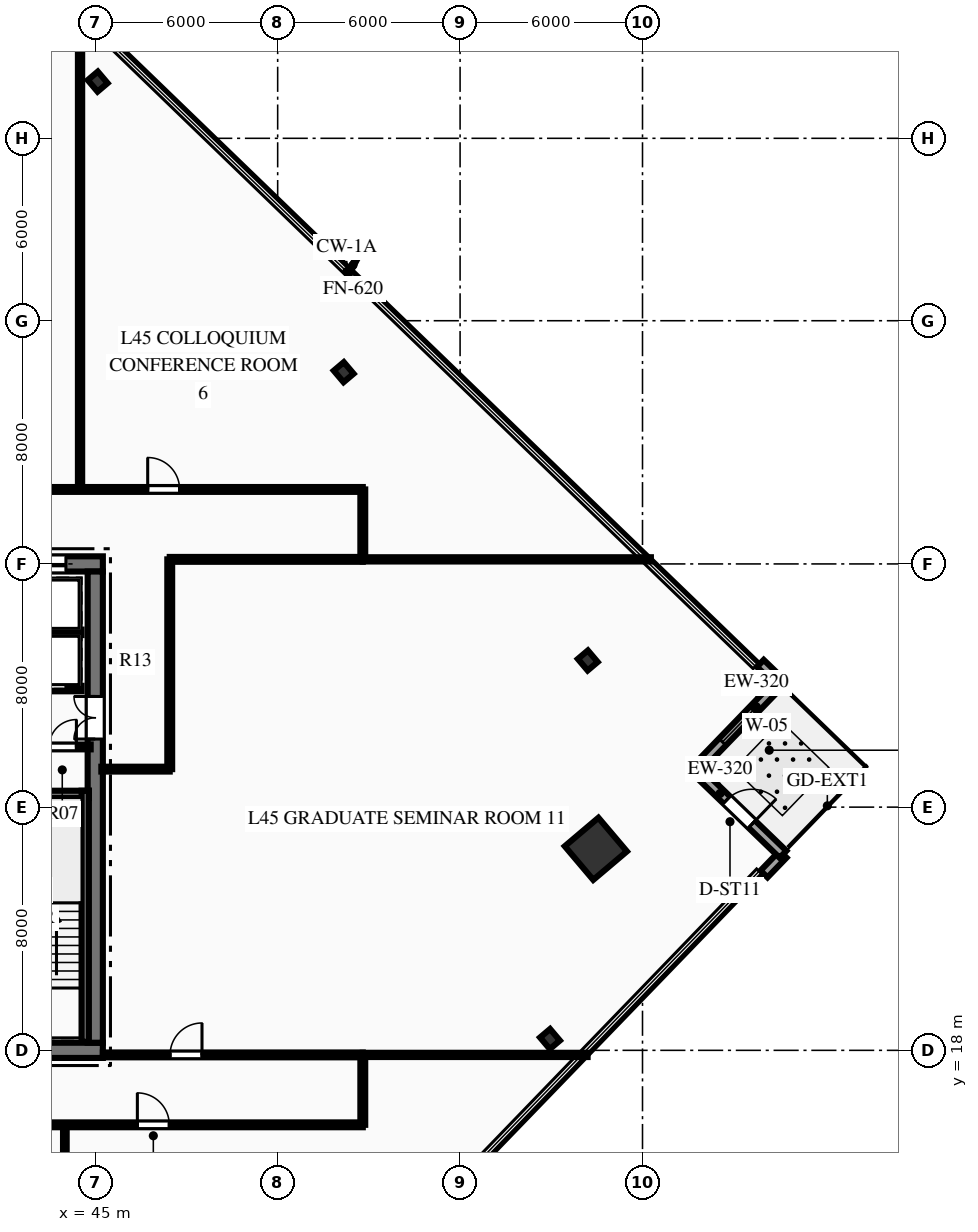
"""IFC4 building model, lengths in metres.
Left out: names, types, materials, properties, quantities, classifications, styles, units other than length and angle.
Written with IfcOpenShell. Run it as: python <this file> out.ifc"""

import sys

from ifc_helpers import new_model, si_unit, direction, frame, frame_2d, origin, origin_2d, place, context, subcontext, project, spatial, rectangle, hollow_rectangle, i_section, extrude, element, fill, save


model = new_model("IFC4")
c1 = context("Model", 3, precision=1e-05, world=origin(), true_north=direction((0.0, 1.0)))
c2 = subcontext(c1, "Body", "Model", "MODEL_VIEW")
j1 = project(units=[si_unit("LENGTHUNIT", "METRE"), si_unit("PLANEANGLEUNIT", "RADIAN")], contexts=[c1])
p1 = place(None, origin())
s1 = spatial("IfcSite", under=j1, at=p1, CompositionType="ELEMENT")
p2 = place(p1, origin())
s2 = spatial("IfcBuilding", under=s1, at=p2, CompositionType="ELEMENT")
p3 = place(p2, frame((0.0, 0.0, 181.95)))
s3 = spatial("IfcBuildingStorey", under=s2, at=p3, CompositionType="ELEMENT", Elevation=181.95)
p4 = place(p3, frame((26.75, 18.0, 0.0), z_axis=(0.0, 0.0, 1.0), x_axis=(1.0, 0.0, 0.0)))
e1 = element("IfcWall", 1, at=p4, inside=s3, PredefinedType="SHEAR", context=c2, shape_type="SweptSolid", body=[
    extrude(rectangle(XDim=18.5, YDim=0.5, at=frame_2d((9.25, 0.0))), origin(), (0.0, 0.0, 1.0), 3.75),
])
p5 = place(p4, frame((7.35, 0.0, 0.0)))
e2 = element("IfcOpeningElement", 2, at=p5, cuts=e1, PredefinedType="OPENING", context=c2, shape_type="SweptSolid", body=[
    extrude(rectangle(XDim=1.1, YDim=2.15, at=frame_2d((0.55, 1.075))), frame((0.0, 0.26, 0.0), z_axis=(0.0, -1.0, 0.0), x_axis=(1.0, 0.0, 0.0)), (0.0, 0.0, 1.0), 0.52),
])
p6 = place(p4, frame((10.05, 0.0, 0.0)))
e3 = element("IfcOpeningElement", 3, at=p6, cuts=e1, PredefinedType="OPENING", context=c2, shape_type="SweptSolid", body=[
    extrude(rectangle(XDim=1.1, YDim=2.15, at=frame_2d((0.55, 1.075))), frame((0.0, 0.26, 0.0), z_axis=(0.0, -1.0, 0.0), x_axis=(1.0, 0.0, 0.0)), (0.0, 0.0, 1.0), 0.52),
])
p7 = place(p3, frame((26.75, 34.0, 0.0), z_axis=(0.0, 0.0, 1.0), x_axis=(1.0, 0.0, 0.0)))
e4 = element("IfcWall", 4, at=p7, inside=s3, PredefinedType="SHEAR", context=c2, shape_type="SweptSolid", body=[
    extrude(rectangle(XDim=18.5, YDim=0.5, at=frame_2d((9.25, 0.0))), origin(), (0.0, 0.0, 1.0), 3.75),
])
p8 = place(p7, frame((13.935, 0.0, 0.0)))
e5 = element("IfcOpeningElement", 5, at=p8, cuts=e4, PredefinedType="OPENING", context=c2, shape_type="SweptSolid", body=[
    extrude(rectangle(XDim=1.1, YDim=2.15, at=frame_2d((0.55, 1.075))), frame((0.0, 0.26, 0.0), z_axis=(0.0, -1.0, 0.0), x_axis=(1.0, 0.0, 0.0)), (0.0, 0.0, 1.0), 0.52),
])
p9 = place(p7, frame((16.185, 0.0, 0.0)))
e6 = element("IfcOpeningElement", 6, at=p9, cuts=e4, PredefinedType="OPENING", context=c2, shape_type="SweptSolid", body=[
    extrude(rectangle(XDim=1.1, YDim=2.15, at=frame_2d((0.55, 1.075))), frame((0.0, 0.26, 0.0), z_axis=(0.0, -1.0, 0.0), x_axis=(1.0, 0.0, 0.0)), (0.0, 0.0, 1.0), 0.52),
])
p10 = place(p3, frame((45.0, 18.25, 0.0), z_axis=(0.0, 0.0, 1.0), x_axis=(0.0, 1.0, 0.0)))
e7 = element("IfcWall", 7, at=p10, inside=s3, PredefinedType="SHEAR", context=c2, shape_type="SweptSolid", body=[
    extrude(rectangle(XDim=15.5, YDim=0.5, at=frame_2d((7.75, 0.0))), origin(), (0.0, 0.0, 1.0), 3.75),
])
p11 = place(p10, frame((9.99, 0.0, 0.0)))
e8 = element("IfcOpeningElement", 8, at=p11, cuts=e7, PredefinedType="OPENING", context=c2, shape_type="SweptSolid", body=[
    extrude(rectangle(XDim=1.4, YDim=2.2, at=frame_2d((0.7, 1.1))), frame((0.0, 0.26, 0.0), z_axis=(0.0, -1.0, 0.0), x_axis=(1.0, 0.0, 0.0)), (0.0, 0.0, 1.0), 0.52),
])
p12 = place(p3, frame((40.81, 26.42, 0.0), z_axis=(0.0, 0.0, 1.0), x_axis=(1.0, 0.0, 0.0)))
e9 = element("IfcWall", 9, at=p12, inside=s3, PredefinedType="SHEAR", context=c2, shape_type="SweptSolid", body=[
    extrude(rectangle(XDim=3.98, YDim=0.24, at=frame_2d((1.99, 0.0))), origin(), (0.0, 0.0, 1.0), 3.75),
])
p13 = place(p3, frame((44.67, 18.28, 0.0), z_axis=(0.0, 0.0, 1.0), x_axis=(0.0, 1.0, 0.0)))
e10 = element("IfcWall", 10, at=p13, inside=s3, PredefinedType="SHEAR", context=c2, shape_type="SweptSolid", body=[
    extrude(rectangle(XDim=8.26, YDim=0.24, at=frame_2d((4.13, 0.0))), origin(), (0.0, 0.0, 1.0), 3.75),
])
p14 = place(p3, frame((61.465, 24.629, 0.0), z_axis=(0.0, 0.0, 1.0), x_axis=(0.763232469783, 0.646123979643, 0.0)))
e11 = element("IfcColumn", 11, at=p14, inside=s3, PredefinedType="COLUMN", context=c2, shape_type="SweptSolid", body=[
    extrude(hollow_rectangle(XDim=1.45, YDim=1.45, WallThickness=0.07, at=origin_2d()), origin(), (0.0, 0.0, 1.0), 3.75),
])
for number, where, z_axis, x_axis in (
    (12, (59.956, 18.373, 0.0), (0.0, 0.0, 1.0), (0.763, 0.646, 0.0)),
    (13, (61.199, 30.824, 0.0), (0.0, 0.0, 1.0), (0.763, 0.646, 0.0)),
    (14, (53.171, 40.307, 0.0), (0.0, 0.0, 1.0), (0.763, 0.646, 0.0)),
    (15, (45.08, 49.865, 0.0), (0.0, 0.0, 1.0), (0.763, 0.646, 0.0)),
):
    element("IfcColumn", number, at=place(p3, frame(where, z_axis=z_axis, x_axis=x_axis)), inside=s3, PredefinedType="COLUMN", context=c2, shape_type="SweptSolid", body=[
        extrude(i_section(OverallWidth=0.432, OverallDepth=0.498, WebThickness=0.056, FlangeThickness=0.089, at=origin_2d()), origin(), (0.0, 0.0, 1.0), 3.75),
    ])
p15 = place(p3, frame((67.622, 24.448, 0.0), z_axis=(0.0, 0.0, 1.0), x_axis=(-0.694657439791, -0.719340699073, 0.0)))
e16 = element("IfcWall", 16, at=p15, inside=s3, PredefinedType="STANDARD", context=c2, shape_type="SweptSolid", body=[
    extrude(rectangle(XDim=0.9, YDim=0.32, at=frame_2d((0.45, 0.0))), origin(), (0.0, 0.0, 1.0), 3.46),
])
p16 = place(p3, frame((64.744, 27.227, 0.0), z_axis=(0.0, 0.0, 1.0), x_axis=(0.719358340361, -0.694639171191, 0.0)))
e17 = element("IfcWall", 17, at=p16, inside=s3, PredefinedType="STANDARD", context=c2, shape_type="SweptSolid", body=[
    extrude(rectangle(XDim=4.0, YDim=0.32, at=frame_2d((2.0, 0.0))), origin(), (0.0, 0.0, 1.0), 3.46),
])
p17 = place(p16, frame((1.425, 0.0, 0.0)))
e18 = element("IfcOpeningElement", 18, at=p17, cuts=e17, PredefinedType="OPENING", context=c2, shape_type="SweptSolid", body=[
    extrude(rectangle(XDim=1.15, YDim=2.2, at=frame_2d((0.575, 1.1))), frame((0.0, 0.17, 0.0), z_axis=(0.0, -1.0, 0.0), x_axis=(1.0, 0.0, 0.0)), (0.0, 0.0, 1.0), 0.34),
])
p18 = place(p3, frame((67.523, 30.104, 0.0), z_axis=(0.0, 0.0, 1.0), x_axis=(-0.694670753348, -0.719327842116, 0.0)))
e19 = element("IfcWall", 19, at=p18, inside=s3, PredefinedType="STANDARD", context=c2, shape_type="SweptSolid", body=[
    extrude(rectangle(XDim=4.0, YDim=0.32, at=frame_2d((2.0, 0.0))), origin(), (0.0, 0.0, 1.0), 3.46),
])
p19 = place(p18, frame((1.275, 0.0, 0.85)))
e20 = element("IfcOpeningElement", 20, at=p19, cuts=e19, PredefinedType="OPENING", context=c2, shape_type="SweptSolid", body=[
    extrude(rectangle(XDim=1.45, YDim=2.05, at=frame_2d((0.725, 1.025))), frame((0.0, 0.17, 0.0), z_axis=(0.0, -1.0, 0.0), x_axis=(1.0, 0.0, 0.0)), (0.0, 0.0, 1.0), 0.34),
])
p20 = place(p3, frame((66.876, 30.729, 0.0), z_axis=(0.0, 0.0, 1.0), x_axis=(0.719340699073, -0.694657439791, 0.0)))
e21 = element("IfcWall", 21, at=p20, inside=s3, PredefinedType="STANDARD", context=c2, shape_type="SweptSolid", body=[
    extrude(rectangle(XDim=0.9, YDim=0.32, at=frame_2d((0.45, 0.0))), origin(), (0.0, 0.0, 1.0), 3.46),
])
p21 = place(p3, frame((40.8, 27.98, 0.0), z_axis=(0.0, 0.0, 1.0), x_axis=(1.0, 0.0, 0.0)))
e22 = element("IfcWall", 22, at=p21, inside=s3, PredefinedType="PARTITIONING", context=c2, shape_type="SweptSolid", body=[
    extrude(rectangle(XDim=4.05, YDim=0.16, at=frame_2d((2.025, 0.0))), origin(), (0.0, 0.0, 1.0), 3.46),
])
p22 = place(p21, frame((0.77, 0.0, 0.0)))
e23 = element("IfcOpeningElement", 23, at=p22, cuts=e22, PredefinedType="OPENING", context=c2, shape_type="SweptSolid", body=[
    extrude(rectangle(XDim=0.9, YDim=2.15, at=frame_2d((0.45, 1.075))), frame((0.0, 0.09, 0.0), z_axis=(0.0, -1.0, 0.0), x_axis=(1.0, 0.0, 0.0)), (0.0, 0.0, 1.0), 0.18),
])
p23 = place(p21, frame((2.68, 0.0, 0.0)))
e24 = element("IfcOpeningElement", 24, at=p23, cuts=e22, PredefinedType="OPENING", context=c2, shape_type="SweptSolid", body=[
    extrude(rectangle(XDim=0.9, YDim=2.15, at=frame_2d((0.45, 1.075))), frame((0.0, 0.09, 0.0), z_axis=(0.0, -1.0, 0.0), x_axis=(1.0, 0.0, 0.0)), (0.0, 0.0, 1.0), 0.18),
])
p24 = place(p3, frame((40.12, 29.9, 0.0), z_axis=(0.0, 0.0, 1.0), x_axis=(1.0, 0.0, 0.0)))
e25 = element("IfcWall", 25, at=p24, inside=s3, PredefinedType="PARTITIONING", context=c2, shape_type="SweptSolid", body=[
    extrude(rectangle(XDim=4.43, YDim=0.18, at=frame_2d((2.215, 0.0))), origin(), (0.0, 0.0, 1.0), 3.46),
])
p25 = place(p24, frame((0.565, 0.0, 0.0)))
e26 = element("IfcOpeningElement", 26, at=p25, cuts=e25, PredefinedType="OPENING", context=c2, shape_type="SweptSolid", body=[
    extrude(rectangle(XDim=1.1, YDim=2.15, at=frame_2d((0.55, 1.075))), frame((0.0, 0.1, 0.0), z_axis=(0.0, -1.0, 0.0), x_axis=(1.0, 0.0, 0.0)), (0.0, 0.0, 1.0), 0.2),
])
p26 = place(p24, frame((2.815, 0.0, 0.0)))
e27 = element("IfcOpeningElement", 27, at=p26, cuts=e25, PredefinedType="OPENING", context=c2, shape_type="SweptSolid", body=[
    extrude(rectangle(XDim=1.1, YDim=2.15, at=frame_2d((0.55, 1.075))), frame((0.0, 0.1, 0.0), z_axis=(0.0, -1.0, 0.0), x_axis=(1.0, 0.0, 0.0)), (0.0, 0.0, 1.0), 0.2),
])
p27 = place(p3, frame((40.12, 31.75, 0.0), z_axis=(0.0, 0.0, 1.0), x_axis=(1.0, 0.0, 0.0)))
e28 = element("IfcWall", 28, at=p27, inside=s3, PredefinedType="PARTITIONING", context=c2, shape_type="SweptSolid", body=[
    extrude(rectangle(XDim=4.43, YDim=0.18, at=frame_2d((2.215, 0.0))), origin(), (0.0, 0.0, 1.0), 3.46),
])
p28 = place(p3, frame((18.2, 15.55, 0.0), z_axis=(0.0, 0.0, 1.0), x_axis=(1.0, 0.0, 0.0)))
e29 = element("IfcWall", 29, at=p28, inside=s3, PredefinedType="PARTITIONING", context=c2, shape_type="SweptSolid", body=[
    extrude(rectangle(XDim=35.6, YDim=0.16, at=frame_2d((17.8, 0.0))), origin(), (0.0, 0.0, 1.0), 3.46),
])
p29 = place(p28, frame((7.55, 0.0, 0.0)))
e30 = element("IfcOpeningElement", 30, at=p29, cuts=e29, PredefinedType="OPENING", context=c2, shape_type="SweptSolid", body=[
    extrude(rectangle(XDim=0.9, YDim=2.15, at=frame_2d((0.45, 1.075))), frame((0.0, 0.09, 0.0), z_axis=(0.0, -1.0, 0.0), x_axis=(1.0, 0.0, 0.0)), (0.0, 0.0, 1.0), 0.18),
])
p30 = place(p28, frame((9.85, 0.0, 0.0)))
e31 = element("IfcOpeningElement", 31, at=p30, cuts=e29, PredefinedType="OPENING", context=c2, shape_type="SweptSolid", body=[
    extrude(rectangle(XDim=0.9, YDim=2.15, at=frame_2d((0.45, 1.075))), frame((0.0, 0.09, 0.0), z_axis=(0.0, -1.0, 0.0), x_axis=(1.0, 0.0, 0.0)), (0.0, 0.0, 1.0), 0.18),
])
p31 = place(p28, frame((12.1, 0.0, 0.0)))
e32 = element("IfcOpeningElement", 32, at=p31, cuts=e29, PredefinedType="OPENING", context=c2, shape_type="SweptSolid", body=[
    extrude(rectangle(XDim=1.0, YDim=2.15, at=frame_2d((0.5, 1.075))), frame((0.0, 0.09, 0.0), z_axis=(0.0, -1.0, 0.0), x_axis=(1.0, 0.0, 0.0)), (0.0, 0.0, 1.0), 0.18),
])
p32 = place(p28, frame((16.975, 0.0, 0.0)))
e33 = element("IfcOpeningElement", 33, at=p32, cuts=e29, PredefinedType="OPENING", context=c2, shape_type="SweptSolid", body=[
    extrude(rectangle(XDim=1.05, YDim=2.15, at=frame_2d((0.525, 1.075))), frame((0.0, 0.09, 0.0), z_axis=(0.0, -1.0, 0.0), x_axis=(1.0, 0.0, 0.0)), (0.0, 0.0, 1.0), 0.18),
])
p33 = place(p28, frame((28.185, 0.0, 0.0)))
e34 = element("IfcOpeningElement", 34, at=p33, cuts=e29, PredefinedType="OPENING", context=c2, shape_type="SweptSolid", body=[
    extrude(rectangle(XDim=1.05, YDim=2.15, at=frame_2d((0.525, 1.075))), frame((0.0, 0.09, 0.0), z_axis=(0.0, -1.0, 0.0), x_axis=(1.0, 0.0, 0.0)), (0.0, 0.0, 1.0), 0.18),
])
p34 = place(p3, frame((45.25, 17.85, 0.0), z_axis=(0.0, 0.0, 1.0), x_axis=(1.0, 0.0, 0.0)))
e35 = element("IfcWall", 35, at=p34, inside=s3, PredefinedType="PARTITIONING", context=c2, shape_type="SweptSolid", body=[
    extrude(rectangle(XDim=8.55, YDim=0.16, at=frame_2d((4.275, 0.0))), origin(), (0.0, 0.0, 1.0), 2.839),
])
p35 = place(p34, frame((2.211, 0.0, 0.0)))
e36 = element("IfcOpeningElement", 36, at=p35, cuts=e35, PredefinedType="OPENING", context=c2, shape_type="SweptSolid", body=[
    extrude(rectangle(XDim=1.05, YDim=2.15, at=frame_2d((0.525, 1.075))), frame((0.0, 0.09, 0.0), z_axis=(0.0, -1.0, 0.0), x_axis=(1.0, 0.0, 0.0)), (0.0, 0.0, 1.0), 0.18),
])
p36 = place(p3, frame((18.2, 36.45, 0.0), z_axis=(0.0, 0.0, 1.0), x_axis=(1.0, 0.0, 0.0)))
e37 = element("IfcWall", 37, at=p36, inside=s3, PredefinedType="PARTITIONING", context=c2, shape_type="SweptSolid", body=[
    extrude(rectangle(XDim=35.6, YDim=0.16, at=frame_2d((17.8, 0.0))), origin(), (0.0, 0.0, 1.0), 3.46),
])
p37 = place(p36, frame((1.917, 0.0, 0.0)))
e38 = element("IfcOpeningElement", 38, at=p37, cuts=e37, PredefinedType="OPENING", context=c2, shape_type="SweptSolid", body=[
    extrude(rectangle(XDim=1.05, YDim=2.15, at=frame_2d((0.525, 1.075))), frame((0.0, 0.09, 0.0), z_axis=(0.0, -1.0, 0.0), x_axis=(1.0, 0.0, 0.0)), (0.0, 0.0, 1.0), 0.18),
])
p38 = place(p36, frame((13.695, 0.0, 0.0)))
e39 = element("IfcOpeningElement", 39, at=p38, cuts=e37, PredefinedType="OPENING", context=c2, shape_type="SweptSolid", body=[
    extrude(rectangle(XDim=1.05, YDim=2.15, at=frame_2d((0.525, 1.075))), frame((0.0, 0.09, 0.0), z_axis=(0.0, -1.0, 0.0), x_axis=(1.0, 0.0, 0.0)), (0.0, 0.0, 1.0), 0.18),
])
p39 = place(p36, frame((19.535, 0.0, 0.0)))
e40 = element("IfcOpeningElement", 40, at=p39, cuts=e37, PredefinedType="OPENING", context=c2, shape_type="SweptSolid", body=[
    extrude(rectangle(XDim=1.05, YDim=2.15, at=frame_2d((0.525, 1.075))), frame((0.0, 0.09, 0.0), z_axis=(0.0, -1.0, 0.0), x_axis=(1.0, 0.0, 0.0)), (0.0, 0.0, 1.0), 0.18),
])
p40 = place(p36, frame((28.525, 0.0, 0.0)))
e41 = element("IfcOpeningElement", 41, at=p40, cuts=e37, PredefinedType="OPENING", context=c2, shape_type="SweptSolid", body=[
    extrude(rectangle(XDim=1.05, YDim=2.15, at=frame_2d((0.525, 1.075))), frame((0.0, 0.09, 0.0), z_axis=(0.0, -1.0, 0.0), x_axis=(1.0, 0.0, 0.0)), (0.0, 0.0, 1.0), 0.18),
])
p41 = place(p3, frame((47.45, 34.15, 0.0), z_axis=(0.0, 0.0, 1.0), x_axis=(1.0, 0.0, 0.0)))
e42 = element("IfcWall", 42, at=p41, inside=s3, PredefinedType="PARTITIONING", context=c2, shape_type="SweptSolid", body=[
    extrude(rectangle(XDim=6.35, YDim=0.16, at=frame_2d((3.175, 0.0))), origin(), (0.0, 0.0, 1.0), 3.46),
])
p42 = place(p3, frame((47.45, 27.25, 0.0), z_axis=(0.0, 0.0, 1.0), x_axis=(0.0, 1.0, 0.0)))
e43 = element("IfcWall", 43, at=p42, inside=s3, PredefinedType="PARTITIONING", context=c2, shape_type="SweptSolid", body=[
    extrude(rectangle(XDim=6.9, YDim=0.16, at=frame_2d((3.45, 0.0))), origin(), (0.0, 0.0, 1.0), 3.46),
])
p43 = place(p3, frame((45.2, 27.25, 0.0), z_axis=(0.0, 0.0, 1.0), x_axis=(1.0, 0.0, 0.0)))
e44 = element("IfcWall", 44, at=p43, inside=s3, PredefinedType="PARTITIONING", context=c2, shape_type="SweptSolid", body=[
    extrude(rectangle(XDim=2.25, YDim=0.16, at=frame_2d((1.125, 0.0))), origin(), (0.0, 0.0, 1.0), 3.46),
])
for number, where, z_axis, x_axis in (
    (45, (53.8, 15.55, 0.0), (0.0, 0.0, 1.0), (0.0, 1.0, 0.0)),
    (46, (53.8, 34.15, 0.0), (0.0, 0.0, 1.0), (0.0, 1.0, 0.0)),
):
    element("IfcWall", number, at=place(p3, frame(where, z_axis=z_axis, x_axis=x_axis)), inside=s3, PredefinedType="PARTITIONING", context=c2, shape_type="SweptSolid", body=[
        extrude(rectangle(XDim=2.3, YDim=0.16, at=frame_2d((1.15, 0.0))), origin(), (0.0, 0.0, 1.0), 3.46),
    ])
p44 = place(p3, frame((53.8, 17.85, 0.0), z_axis=(0.0, 0.0, 1.0), x_axis=(1.0, 0.0, 0.0)))
e47 = element("IfcWall", 47, at=p44, inside=s3, PredefinedType="PARTITIONING", context=c2, shape_type="SweptSolid", body=[
    extrude(rectangle(XDim=7.395, YDim=0.14, at=frame_2d((3.697, 0.0))), origin(), (0.0, 0.0, 1.0), 2.839),
])
p45 = place(p3, frame((53.8, 34.15, 0.0), z_axis=(0.0, 0.0, 1.0), x_axis=(1.0, 0.0, 0.0)))
e48 = element("IfcWall", 48, at=p45, inside=s3, PredefinedType="PARTITIONING", context=c2, shape_type="SweptSolid", body=[
    extrude(rectangle(XDim=9.476, YDim=0.14, at=frame_2d((4.738, 0.0))), origin(), (0.0, 0.0, 1.0), 3.46),
])
p46 = place(p3, frame((44.0, 0.044, 0.0), z_axis=(0.0, 0.0, 1.0), x_axis=(0.0, 1.0, 0.0)))
e49 = element("IfcWall", 49, at=p46, inside=s3, PredefinedType="PARTITIONING", context=c2, shape_type="SweptSolid", body=[
    extrude(rectangle(XDim=15.506, YDim=0.12, at=frame_2d((7.753, 0.0))), origin(), (0.0, 0.0, 1.0), 3.46),
])
p47 = place(p3, frame((44.5, 36.45, 0.0), z_axis=(0.0, 0.0, 1.0), x_axis=(0.0, 1.0, 0.0)))
e50 = element("IfcWall", 50, at=p47, inside=s3, PredefinedType="PARTITIONING", context=c2, shape_type="SweptSolid", body=[
    extrude(rectangle(XDim=15.832, YDim=0.14, at=frame_2d((7.916, 0.0))), origin(), (0.0, 0.0, 1.0), 3.46),
])
p48 = place(p17, origin())
e51 = element("IfcDoor", 51, at=p48, inside=s3, OperationType="SINGLE_SWING_RIGHT", PredefinedType="DOOR", context=c2, shape_type="SweptSolid", body=[
    extrude(rectangle(XDim=1.15, YDim=2.2, at=frame_2d((0.575, 1.1))), frame((0.0, 0.025, 0.0), z_axis=(0.0, -1.0, 0.0), x_axis=(1.0, 0.0, 0.0)), (0.0, 0.0, 1.0), 0.05),
])
fill(e18, e51)
p49 = place(p19, origin())
e52 = element("IfcWindow", 52, at=p49, inside=s3, PartitioningType="SINGLE_PANEL", PredefinedType="WINDOW", context=c2, shape_type="SweptSolid", body=[
    extrude(rectangle(XDim=1.45, YDim=2.05, at=frame_2d((0.725, 1.025))), frame((0.0, 0.03, 0.0), z_axis=(0.0, -1.0, 0.0), x_axis=(1.0, 0.0, 0.0)), (0.0, 0.0, 1.0), 0.06),
])
fill(e20, e52)
p50 = place(p23, origin())
e53 = element("IfcDoor", 53, at=p50, inside=s3, OperationType="SINGLE_SWING_RIGHT", PredefinedType="DOOR", context=c2, shape_type="SweptSolid", body=[
    extrude(rectangle(XDim=0.9, YDim=2.15, at=frame_2d((0.45, 1.075))), frame((0.0, 0.025, 0.0), z_axis=(0.0, -1.0, 0.0), x_axis=(1.0, 0.0, 0.0)), (0.0, 0.0, 1.0), 0.05),
])
fill(e24, e53)
p51 = place(p11, origin())
e54 = element("IfcDoor", 54, at=p51, inside=s3, OperationType="DOUBLE_DOOR_SINGLE_SWING", PredefinedType="DOOR", context=c2, shape_type="SweptSolid", body=[
    extrude(rectangle(XDim=1.4, YDim=2.2, at=frame_2d((0.7, 1.1))), frame((0.0, 0.025, 0.0), z_axis=(0.0, -1.0, 0.0), x_axis=(1.0, 0.0, 0.0)), (0.0, 0.0, 1.0), 0.05),
])
fill(e8, e54)
p52 = place(p33, origin())
e55 = element("IfcDoor", 55, at=p52, inside=s3, OperationType="SINGLE_SWING_LEFT", PredefinedType="DOOR", context=c2, shape_type="SweptSolid", body=[
    extrude(rectangle(XDim=1.05, YDim=2.15, at=frame_2d((0.525, 1.075))), frame((0.0, 0.025, 0.0), z_axis=(0.0, -1.0, 0.0), x_axis=(1.0, 0.0, 0.0)), (0.0, 0.0, 1.0), 0.05),
])
fill(e34, e55)
p53 = place(p40, origin())
e56 = element("IfcDoor", 56, at=p53, inside=s3, OperationType="SINGLE_SWING_LEFT", PredefinedType="DOOR", context=c2, shape_type="SweptSolid", body=[
    extrude(rectangle(XDim=1.05, YDim=2.15, at=frame_2d((0.525, 1.075))), frame((0.0, 0.025, 0.0), z_axis=(0.0, -1.0, 0.0), x_axis=(1.0, 0.0, 0.0)), (0.0, 0.0, 1.0), 0.05),
])
fill(e41, e56)
p54 = place(p35, origin())
e57 = element("IfcDoor", 57, at=p54, inside=s3, OperationType="SINGLE_SWING_RIGHT", PredefinedType="DOOR", context=c2, shape_type="SweptSolid", body=[
    extrude(rectangle(XDim=1.05, YDim=2.15, at=frame_2d((0.525, 1.075))), frame((0.0, 0.025, 0.0), z_axis=(0.0, -1.0, 0.0), x_axis=(1.0, 0.0, 0.0)), (0.0, 0.0, 1.0), 0.05),
])
fill(e36, e57)
p55 = place(p26, origin())
e58 = element("IfcDoor", 58, at=p55, inside=s3, OperationType="SLIDING_TO_LEFT", PredefinedType="DOOR", context=c2, shape_type="SweptSolid", body=[
    extrude(rectangle(XDim=1.1, YDim=2.15, at=frame_2d((0.55, 1.075))), frame((0.0, 0.025, 0.0), z_axis=(0.0, -1.0, 0.0), x_axis=(1.0, 0.0, 0.0)), (0.0, 0.0, 1.0), 0.05),
])
fill(e27, e58)
p56 = place(p9, origin())
e59 = element("IfcDoor", 59, at=p56, inside=s3, OperationType="SLIDING_TO_LEFT", PredefinedType="DOOR", context=c2, shape_type="SweptSolid", body=[
    extrude(rectangle(XDim=1.1, YDim=2.15, at=frame_2d((0.55, 1.075))), frame((0.0, 0.025, 0.0), z_axis=(0.0, -1.0, 0.0), x_axis=(1.0, 0.0, 0.0)), (0.0, 0.0, 1.0), 0.05),
])
fill(e6, e59)
save(model, sys.argv[1])
